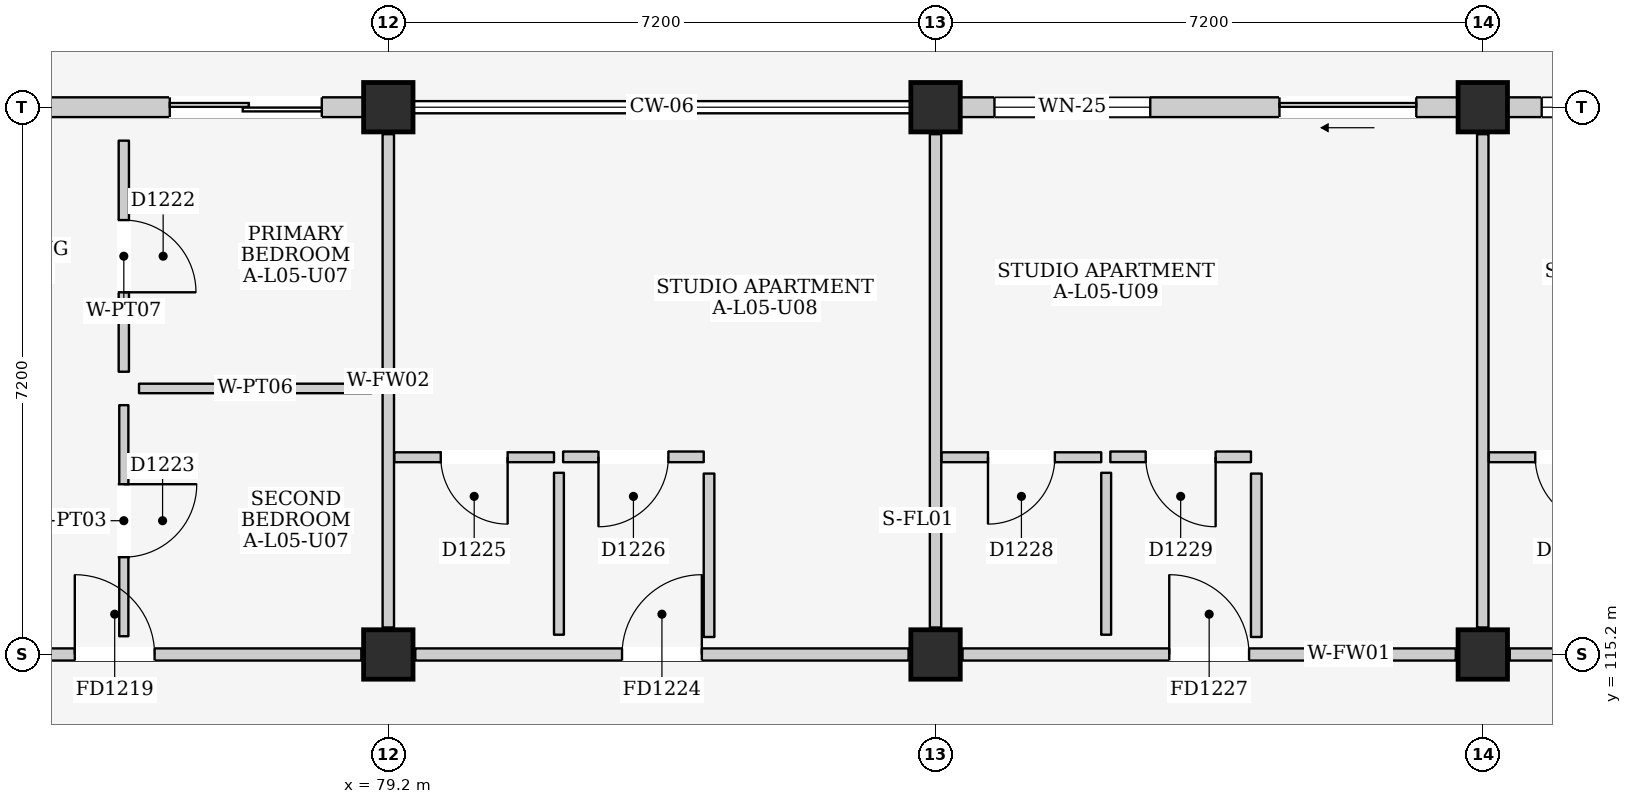
"""IFC4 building model, lengths in metres.
Left out: names, types, materials, properties, quantities, classifications, styles, units other than length and angle.
Written with IfcOpenShell. Run it as: python <this file> out.ifc"""

import sys

from ifc_helpers import new_model, si_unit, direction, frame, frame_2d, origin, origin_2d, place, context, subcontext, project, spatial, rectangle, extrude, element, fill, save


model = new_model("IFC4")
c1 = context("Model", 3, precision=1e-05, world=origin(), true_north=direction((0.0, 1.0)))
c2 = subcontext(c1, "Body", "Model", "MODEL_VIEW")
j1 = project(units=[si_unit("LENGTHUNIT", "METRE"), si_unit("PLANEANGLEUNIT", "RADIAN")], contexts=[c1])
p1 = place(None, origin())
s1 = spatial("IfcSite", under=j1, at=p1, CompositionType="ELEMENT")
p2 = place(p1, origin())
s2 = spatial("IfcBuilding", under=s1, at=p2, CompositionType="ELEMENT")
p3 = place(p2, frame((0.0, 0.0, 18.6)))
s3 = spatial("IfcBuildingStorey", under=s2, at=p3, CompositionType="ELEMENT", Elevation=18.6)
for number, where, z_axis, x_axis in (
    (1, (79.2, 115.2, 0.0), (0.0, 0.0, 1.0), (1.0, 0.0, 0.0)),
    (2, (79.2, 122.4, 0.0), (0.0, 0.0, 1.0), (1.0, 0.0, 0.0)),
    (3, (86.4, 115.2, 0.0), (0.0, 0.0, 1.0), (1.0, 0.0, 0.0)),
    (4, (86.4, 122.4, 0.0), (0.0, 0.0, 1.0), (1.0, 0.0, 0.0)),
    (5, (93.6, 115.2, 0.0), (0.0, 0.0, 1.0), (1.0, 0.0, 0.0)),
    (6, (93.6, 122.4, 0.0), (0.0, 0.0, 1.0), (1.0, 0.0, 0.0)),
):
    element("IfcColumn", number, at=place(p3, frame(where, z_axis=z_axis, x_axis=x_axis)), inside=s3, PredefinedType="COLUMN", context=c2, shape_type="SweptSolid", body=[
        extrude(rectangle(XDim=0.65, YDim=0.65, at=origin_2d()), origin(), (0.0, 0.0, 1.0), 3.3),
    ])
p4 = place(p3, frame((72.325, 122.4, 0.0), z_axis=(0.0, 0.0, 1.0), x_axis=(1.0, 0.0, 0.0)))
e7 = element("IfcWall", 7, at=p4, inside=s3, PredefinedType="ELEMENTEDWALL", context=c2, shape_type="SweptSolid", body=[
    extrude(rectangle(XDim=6.55, YDim=0.26, at=frame_2d((3.275, 0.0))), origin(), (0.0, 0.0, 1.0), 2.595),
])
p5 = place(p4, frame((4.0, 0.0, 0.0)))
e8 = element("IfcOpeningElement", 8, at=p5, cuts=e7, PredefinedType="OPENING", context=c2, shape_type="SweptSolid", body=[
    extrude(rectangle(XDim=2.0, YDim=2.12, at=frame_2d((1.0, 1.06))), frame((0.0, 0.145, 0.0), z_axis=(0.0, -1.0, 0.0), x_axis=(1.0, 0.0, 0.0)), (0.0, 0.0, 1.0), 0.29),
])
p6 = place(p4, frame((0.45, 0.0, 0.9)))
e9 = element("IfcOpeningElement", 9, at=p6, cuts=e7, PredefinedType="OPENING", context=c2, shape_type="SweptSolid", body=[
    extrude(rectangle(XDim=1.85, YDim=1.4, at=frame_2d((0.925, 0.7))), frame((0.0, 0.145, 0.0), z_axis=(0.0, -1.0, 0.0), x_axis=(1.0, 0.0, 0.0)), (0.0, 0.0, 1.0), 0.29),
])
p7 = place(p3, frame((86.725, 122.4, 0.0), z_axis=(0.0, 0.0, 1.0), x_axis=(1.0, 0.0, 0.0)))
e10 = element("IfcWall", 10, at=p7, inside=s3, PredefinedType="ELEMENTEDWALL", context=c2, shape_type="SweptSolid", body=[
    extrude(rectangle(XDim=6.55, YDim=0.26, at=frame_2d((3.275, 0.0))), origin(), (0.0, 0.0, 1.0), 2.595),
])
p8 = place(p7, frame((4.2, 0.0, 0.0)))
e11 = element("IfcOpeningElement", 11, at=p8, cuts=e10, PredefinedType="OPENING", context=c2, shape_type="SweptSolid", body=[
    extrude(rectangle(XDim=1.8, YDim=2.12, at=frame_2d((0.9, 1.06))), frame((0.0, 0.145, 0.0), z_axis=(0.0, -1.0, 0.0), x_axis=(1.0, 0.0, 0.0)), (0.0, 0.0, 1.0), 0.29),
])
p9 = place(p7, frame((0.45, 0.0, 0.885)))
e12 = element("IfcOpeningElement", 12, at=p9, cuts=e10, PredefinedType="OPENING", context=c2, shape_type="SweptSolid", body=[
    extrude(rectangle(XDim=2.05, YDim=1.6, at=frame_2d((1.025, 0.8))), frame((0.0, 0.145, 0.0), z_axis=(0.0, -1.0, 0.0), x_axis=(1.0, 0.0, 0.0)), (0.0, 0.0, 1.0), 0.29),
])
p10 = place(p3, frame((93.925, 122.4, 0.0), z_axis=(0.0, 0.0, 1.0), x_axis=(1.0, 0.0, 0.0)))
e13 = element("IfcWall", 13, at=p10, inside=s3, PredefinedType="ELEMENTEDWALL", context=c2, shape_type="SweptSolid", body=[
    extrude(rectangle(XDim=6.55, YDim=0.26, at=frame_2d((3.275, 0.0))), origin(), (0.0, 0.0, 1.0), 2.595),
])
p11 = place(p10, frame((4.4, 0.0, 0.0)))
e14 = element("IfcOpeningElement", 14, at=p11, cuts=e13, PredefinedType="OPENING", context=c2, shape_type="SweptSolid", body=[
    extrude(rectangle(XDim=1.6, YDim=2.12, at=frame_2d((0.8, 1.06))), frame((0.0, 0.145, 0.0), z_axis=(0.0, -1.0, 0.0), x_axis=(1.0, 0.0, 0.0)), (0.0, 0.0, 1.0), 0.29),
])
p12 = place(p10, frame((0.45, 0.0, 0.9)))
e15 = element("IfcOpeningElement", 15, at=p12, cuts=e13, PredefinedType="OPENING", context=c2, shape_type="SweptSolid", body=[
    extrude(rectangle(XDim=1.75, YDim=1.55, at=frame_2d((0.875, 0.775))), frame((0.0, 0.145, 0.0), z_axis=(0.0, -1.0, 0.0), x_axis=(1.0, 0.0, 0.0)), (0.0, 0.0, 1.0), 0.29),
])
p13 = place(p3, frame((72.355, 115.2, 0.0), z_axis=(0.0, 0.0, 1.0), x_axis=(1.0, 0.0, 0.0)))
e16 = element("IfcWall", 16, at=p13, inside=s3, PredefinedType="PARTITIONING", context=c2, shape_type="SweptSolid", body=[
    extrude(rectangle(XDim=6.49, YDim=0.16, at=frame_2d((3.245, 0.0))), origin(), (0.0, 0.0, 1.0), 2.395),
])
p14 = place(p13, frame((2.72, 0.0, 0.0)))
e17 = element("IfcOpeningElement", 17, at=p14, cuts=e16, PredefinedType="OPENING", context=c2, shape_type="SweptSolid", body=[
    extrude(rectangle(XDim=1.05, YDim=2.15, at=frame_2d((0.525, 1.075))), frame((0.0, 0.095, 0.0), z_axis=(0.0, -1.0, 0.0), x_axis=(1.0, 0.0, 0.0)), (0.0, 0.0, 1.0), 0.19),
])
p15 = place(p3, frame((79.2, 115.555, 0.0), z_axis=(0.0, 0.0, 1.0), x_axis=(0.0, 1.0, 0.0)))
e18 = element("IfcWall", 18, at=p15, inside=s3, PredefinedType="PARTITIONING", context=c2, shape_type="SweptSolid", body=[
    extrude(rectangle(XDim=6.49, YDim=0.15, at=frame_2d((3.245, 0.0))), origin(), (0.0, 0.0, 1.0), 2.545),
])
p16 = place(p3, frame((75.72, 118.92, 0.0), z_axis=(0.0, 0.0, 1.0), x_axis=(0.0, 1.0, 0.0)))
e19 = element("IfcWall", 19, at=p16, inside=s3, PredefinedType="PARTITIONING", context=c2, shape_type="SweptSolid", body=[
    extrude(rectangle(XDim=3.04, YDim=0.135, at=frame_2d((1.52, 0.0))), origin(), (0.0, 0.0, 1.0), 3.06),
])
p17 = place(p16, frame((1.045, 0.0, 0.0)))
e20 = element("IfcOpeningElement", 20, at=p17, cuts=e19, PredefinedType="OPENING", context=c2, shape_type="SweptSolid", body=[
    extrude(rectangle(XDim=0.95, YDim=2.15, at=frame_2d((0.475, 1.075))), frame((0.0, 0.083, 0.0), z_axis=(0.0, -1.0, 0.0), x_axis=(1.0, 0.0, 0.0)), (0.0, 0.0, 1.0), 0.165),
])
p18 = place(p3, frame((75.92, 118.7, 0.0), z_axis=(0.0, 0.0, 1.0), x_axis=(1.0, 0.0, 0.0)))
e21 = element("IfcWall", 21, at=p18, inside=s3, PredefinedType="PARTITIONING", context=c2, shape_type="SweptSolid", body=[
    extrude(rectangle(XDim=3.06, YDim=0.125, at=frame_2d((1.53, 0.0))), origin(), (0.0, 0.0, 1.0), 3.06),
])
p19 = place(p3, frame((75.72, 115.44, 0.0), z_axis=(0.0, 0.0, 1.0), x_axis=(0.0, 1.0, 0.0)))
e22 = element("IfcWall", 22, at=p19, inside=s3, PredefinedType="PARTITIONING", context=c2, shape_type="SweptSolid", body=[
    extrude(rectangle(XDim=3.04, YDim=0.12, at=frame_2d((1.52, 0.0))), origin(), (0.0, 0.0, 1.0), 3.06),
])
p20 = place(p19, frame((1.04, 0.0, 0.0)))
e23 = element("IfcOpeningElement", 23, at=p20, cuts=e22, PredefinedType="OPENING", context=c2, shape_type="SweptSolid", body=[
    extrude(rectangle(XDim=0.96, YDim=2.15, at=frame_2d((0.48, 1.075))), frame((0.0, 0.075, 0.0), z_axis=(0.0, -1.0, 0.0), x_axis=(1.0, 0.0, 0.0)), (0.0, 0.0, 1.0), 0.15),
])
p21 = place(p3, frame((79.555, 115.2, 0.0), z_axis=(0.0, 0.0, 1.0), x_axis=(1.0, 0.0, 0.0)))
e24 = element("IfcWall", 24, at=p21, inside=s3, PredefinedType="PARTITIONING", context=c2, shape_type="SweptSolid", body=[
    extrude(rectangle(XDim=6.49, YDim=0.16, at=frame_2d((3.245, 0.0))), origin(), (0.0, 0.0, 1.0), 2.395),
])
p22 = place(p21, frame((2.72, 0.0, 0.0)))
e25 = element("IfcOpeningElement", 25, at=p22, cuts=e24, PredefinedType="OPENING", context=c2, shape_type="SweptSolid", body=[
    extrude(rectangle(XDim=1.05, YDim=2.15, at=frame_2d((0.525, 1.075))), frame((0.0, 0.095, 0.0), z_axis=(0.0, -1.0, 0.0), x_axis=(1.0, 0.0, 0.0)), (0.0, 0.0, 1.0), 0.19),
])
p23 = place(p3, frame((86.4, 115.555, 0.0), z_axis=(0.0, 0.0, 1.0), x_axis=(0.0, 1.0, 0.0)))
e26 = element("IfcWall", 26, at=p23, inside=s3, PredefinedType="PARTITIONING", context=c2, shape_type="SweptSolid", body=[
    extrude(rectangle(XDim=6.49, YDim=0.15, at=frame_2d((3.245, 0.0))), origin(), (0.0, 0.0, 1.0), 2.545),
])
p24 = place(p3, frame((79.28, 117.795, 0.0), z_axis=(0.0, 0.0, 1.0), x_axis=(1.0, 0.0, 0.0)))
e27 = element("IfcWall", 27, at=p24, inside=s3, PredefinedType="PARTITIONING", context=c2, shape_type="SweptSolid", body=[
    extrude(rectangle(XDim=2.1, YDim=0.13, at=frame_2d((1.05, 0.0))), origin(), (0.0, 0.0, 1.0), 3.06),
])
p25 = place(p24, frame((0.61, 0.0, 0.0)))
e28 = element("IfcOpeningElement", 28, at=p25, cuts=e27, PredefinedType="OPENING", context=c2, shape_type="SweptSolid", body=[
    extrude(rectangle(XDim=0.88, YDim=2.1, at=frame_2d((0.44, 1.05))), frame((0.0, 0.08, 0.0), z_axis=(0.0, -1.0, 0.0), x_axis=(1.0, 0.0, 0.0)), (0.0, 0.0, 1.0), 0.16),
])
p26 = place(p3, frame((81.445, 115.46, 0.0), z_axis=(0.0, 0.0, 1.0), x_axis=(0.0, 1.0, 0.0)))
e29 = element("IfcWall", 29, at=p26, inside=s3, PredefinedType="PARTITIONING", context=c2, shape_type="SweptSolid", body=[
    extrude(rectangle(XDim=2.13, YDim=0.13, at=frame_2d((1.065, 0.0))), origin(), (0.0, 0.0, 1.0), 3.06),
])
p27 = place(p3, frame((81.5, 117.8, 0.0), z_axis=(0.0, 0.0, 1.0), x_axis=(1.0, 0.0, 0.0)))
e30 = element("IfcWall", 30, at=p27, inside=s3, PredefinedType="PARTITIONING", context=c2, shape_type="SweptSolid", body=[
    extrude(rectangle(XDim=1.85, YDim=0.14, at=frame_2d((0.925, 0.0))), origin(), (0.0, 0.0, 1.0), 3.06),
])
p28 = place(p27, frame((0.465, 0.0, 0.0)))
e31 = element("IfcOpeningElement", 31, at=p28, cuts=e30, PredefinedType="OPENING", context=c2, shape_type="SweptSolid", body=[
    extrude(rectangle(XDim=0.92, YDim=2.1, at=frame_2d((0.46, 1.05))), frame((0.0, 0.085, 0.0), z_axis=(0.0, -1.0, 0.0), x_axis=(1.0, 0.0, 0.0)), (0.0, 0.0, 1.0), 0.17),
])
p29 = place(p3, frame((83.42, 115.43, 0.0), z_axis=(0.0, 0.0, 1.0), x_axis=(0.0, 1.0, 0.0)))
e32 = element("IfcWall", 32, at=p29, inside=s3, PredefinedType="PARTITIONING", context=c2, shape_type="SweptSolid", body=[
    extrude(rectangle(XDim=2.15, YDim=0.14, at=frame_2d((1.075, 0.0))), origin(), (0.0, 0.0, 1.0), 3.06),
])
p30 = place(p3, frame((86.755, 115.2, 0.0), z_axis=(0.0, 0.0, 1.0), x_axis=(1.0, 0.0, 0.0)))
e33 = element("IfcWall", 33, at=p30, inside=s3, PredefinedType="PARTITIONING", context=c2, shape_type="SweptSolid", body=[
    extrude(rectangle(XDim=6.49, YDim=0.16, at=frame_2d((3.245, 0.0))), origin(), (0.0, 0.0, 1.0), 2.395),
])
p31 = place(p30, frame((2.72, 0.0, 0.0)))
e34 = element("IfcOpeningElement", 34, at=p31, cuts=e33, PredefinedType="OPENING", context=c2, shape_type="SweptSolid", body=[
    extrude(rectangle(XDim=1.05, YDim=2.15, at=frame_2d((0.525, 1.075))), frame((0.0, 0.095, 0.0), z_axis=(0.0, -1.0, 0.0), x_axis=(1.0, 0.0, 0.0)), (0.0, 0.0, 1.0), 0.19),
])
p32 = place(p3, frame((93.6, 115.555, 0.0), z_axis=(0.0, 0.0, 1.0), x_axis=(0.0, 1.0, 0.0)))
e35 = element("IfcWall", 35, at=p32, inside=s3, PredefinedType="PARTITIONING", context=c2, shape_type="SweptSolid", body=[
    extrude(rectangle(XDim=6.49, YDim=0.15, at=frame_2d((3.245, 0.0))), origin(), (0.0, 0.0, 1.0), 2.545),
])
p33 = place(p3, frame((86.48, 117.795, 0.0), z_axis=(0.0, 0.0, 1.0), x_axis=(1.0, 0.0, 0.0)))
e36 = element("IfcWall", 36, at=p33, inside=s3, PredefinedType="PARTITIONING", context=c2, shape_type="SweptSolid", body=[
    extrude(rectangle(XDim=2.1, YDim=0.13, at=frame_2d((1.05, 0.0))), origin(), (0.0, 0.0, 1.0), 3.06),
])
p34 = place(p33, frame((0.61, 0.0, 0.0)))
e37 = element("IfcOpeningElement", 37, at=p34, cuts=e36, PredefinedType="OPENING", context=c2, shape_type="SweptSolid", body=[
    extrude(rectangle(XDim=0.88, YDim=2.1, at=frame_2d((0.44, 1.05))), frame((0.0, 0.08, 0.0), z_axis=(0.0, -1.0, 0.0), x_axis=(1.0, 0.0, 0.0)), (0.0, 0.0, 1.0), 0.16),
])
p35 = place(p3, frame((88.645, 115.46, 0.0), z_axis=(0.0, 0.0, 1.0), x_axis=(0.0, 1.0, 0.0)))
e38 = element("IfcWall", 38, at=p35, inside=s3, PredefinedType="PARTITIONING", context=c2, shape_type="SweptSolid", body=[
    extrude(rectangle(XDim=2.13, YDim=0.13, at=frame_2d((1.065, 0.0))), origin(), (0.0, 0.0, 1.0), 3.06),
])
p36 = place(p3, frame((88.7, 117.8, 0.0), z_axis=(0.0, 0.0, 1.0), x_axis=(1.0, 0.0, 0.0)))
e39 = element("IfcWall", 39, at=p36, inside=s3, PredefinedType="PARTITIONING", context=c2, shape_type="SweptSolid", body=[
    extrude(rectangle(XDim=1.85, YDim=0.14, at=frame_2d((0.925, 0.0))), origin(), (0.0, 0.0, 1.0), 3.06),
])
p37 = place(p36, frame((0.465, 0.0, 0.0)))
e40 = element("IfcOpeningElement", 40, at=p37, cuts=e39, PredefinedType="OPENING", context=c2, shape_type="SweptSolid", body=[
    extrude(rectangle(XDim=0.92, YDim=2.1, at=frame_2d((0.46, 1.05))), frame((0.0, 0.085, 0.0), z_axis=(0.0, -1.0, 0.0), x_axis=(1.0, 0.0, 0.0)), (0.0, 0.0, 1.0), 0.17),
])
p38 = place(p3, frame((90.62, 115.43, 0.0), z_axis=(0.0, 0.0, 1.0), x_axis=(0.0, 1.0, 0.0)))
e41 = element("IfcWall", 41, at=p38, inside=s3, PredefinedType="PARTITIONING", context=c2, shape_type="SweptSolid", body=[
    extrude(rectangle(XDim=2.15, YDim=0.14, at=frame_2d((1.075, 0.0))), origin(), (0.0, 0.0, 1.0), 3.06),
])
p39 = place(p3, frame((93.955, 115.2, 0.0), z_axis=(0.0, 0.0, 1.0), x_axis=(1.0, 0.0, 0.0)))
e42 = element("IfcWall", 42, at=p39, inside=s3, PredefinedType="PARTITIONING", context=c2, shape_type="SweptSolid", body=[
    extrude(rectangle(XDim=6.49, YDim=0.16, at=frame_2d((3.245, 0.0))), origin(), (0.0, 0.0, 1.0), 2.395),
])
p40 = place(p39, frame((2.72, 0.0, 0.0)))
e43 = element("IfcOpeningElement", 43, at=p40, cuts=e42, PredefinedType="OPENING", context=c2, shape_type="SweptSolid", body=[
    extrude(rectangle(XDim=1.05, YDim=2.15, at=frame_2d((0.525, 1.075))), frame((0.0, 0.095, 0.0), z_axis=(0.0, -1.0, 0.0), x_axis=(1.0, 0.0, 0.0)), (0.0, 0.0, 1.0), 0.19),
])
p41 = place(p3, frame((93.68, 117.795, 0.0), z_axis=(0.0, 0.0, 1.0), x_axis=(1.0, 0.0, 0.0)))
e44 = element("IfcWall", 44, at=p41, inside=s3, PredefinedType="PARTITIONING", context=c2, shape_type="SweptSolid", body=[
    extrude(rectangle(XDim=2.1, YDim=0.13, at=frame_2d((1.05, 0.0))), origin(), (0.0, 0.0, 1.0), 3.06),
])
p42 = place(p41, frame((0.61, 0.0, 0.0)))
e45 = element("IfcOpeningElement", 45, at=p42, cuts=e44, PredefinedType="OPENING", context=c2, shape_type="SweptSolid", body=[
    extrude(rectangle(XDim=0.88, YDim=2.1, at=frame_2d((0.44, 1.05))), frame((0.0, 0.08, 0.0), z_axis=(0.0, -1.0, 0.0), x_axis=(1.0, 0.0, 0.0)), (0.0, 0.0, 1.0), 0.16),
])
p43 = place(p5, frame((2.0, 0.0, 0.0), z_axis=(0.0, 0.0, 1.0), x_axis=(-1.0, 0.0, 0.0)))
e46 = element("IfcDoor", 46, at=p43, inside=s3, OperationType="DOUBLE_DOOR_SLIDING", PredefinedType="DOOR", context=c2, shape_type="SweptSolid", body=[
    extrude(rectangle(XDim=2.0, YDim=2.12, at=frame_2d((1.0, 1.06))), frame((0.0, 0.025, 0.0), z_axis=(0.0, -1.0, 0.0), x_axis=(1.0, 0.0, 0.0)), (0.0, 0.0, 1.0), 0.05),
])
fill(e8, e46)
p44 = place(p8, frame((1.8, 0.0, 0.0), z_axis=(0.0, 0.0, 1.0), x_axis=(-1.0, 0.0, 0.0)))
e47 = element("IfcDoor", 47, at=p44, inside=s3, OperationType="SLIDING_TO_LEFT", PredefinedType="DOOR", context=c2, shape_type="SweptSolid", body=[
    extrude(rectangle(XDim=1.8, YDim=2.12, at=frame_2d((0.9, 1.06))), frame((0.0, 0.025, 0.0), z_axis=(0.0, -1.0, 0.0), x_axis=(1.0, 0.0, 0.0)), (0.0, 0.0, 1.0), 0.05),
])
fill(e11, e47)
p45 = place(p9, origin())
e48 = element("IfcWindow", 48, at=p45, inside=s3, PartitioningType="DOUBLE_PANEL_VERTICAL", PredefinedType="WINDOW", context=c2, shape_type="SweptSolid", body=[
    extrude(rectangle(XDim=2.05, YDim=1.6, at=frame_2d((1.025, 0.8))), frame((0.0, 0.03, 0.0), z_axis=(0.0, -1.0, 0.0), x_axis=(1.0, 0.0, 0.0)), (0.0, 0.0, 1.0), 0.06),
])
fill(e12, e48)
p46 = place(p12, origin())
e49 = element("IfcWindow", 49, at=p46, inside=s3, PartitioningType="DOUBLE_PANEL_VERTICAL", PredefinedType="WINDOW", context=c2, shape_type="SweptSolid", body=[
    extrude(rectangle(XDim=1.75, YDim=1.55, at=frame_2d((0.875, 0.775))), frame((0.0, 0.03, 0.0), z_axis=(0.0, -1.0, 0.0), x_axis=(1.0, 0.0, 0.0)), (0.0, 0.0, 1.0), 0.06),
])
fill(e15, e49)
p47 = place(p14, origin())
e50 = element("IfcDoor", 50, at=p47, inside=s3, OperationType="SINGLE_SWING_LEFT", PredefinedType="DOOR", context=c2, shape_type="SweptSolid", body=[
    extrude(rectangle(XDim=1.05, YDim=2.15, at=frame_2d((0.525, 1.075))), frame((0.0, 0.025, 0.0), z_axis=(0.0, -1.0, 0.0), x_axis=(1.0, 0.0, 0.0)), (0.0, 0.0, 1.0), 0.05),
])
fill(e17, e50)
p48 = place(p17, frame((0.95, 0.0, 0.0), z_axis=(0.0, 0.0, 1.0), x_axis=(-1.0, 0.0, 0.0)))
e51 = element("IfcDoor", 51, at=p48, inside=s3, OperationType="SINGLE_SWING_RIGHT", PredefinedType="DOOR", context=c2, shape_type="SweptSolid", body=[
    extrude(rectangle(XDim=0.95, YDim=2.15, at=frame_2d((0.475, 1.075))), frame((0.0, 0.025, 0.0), z_axis=(0.0, -1.0, 0.0), x_axis=(1.0, 0.0, 0.0)), (0.0, 0.0, 1.0), 0.05),
])
fill(e20, e51)
p49 = place(p20, frame((0.96, 0.0, 0.0), z_axis=(0.0, 0.0, 1.0), x_axis=(-1.0, 0.0, 0.0)))
e52 = element("IfcDoor", 52, at=p49, inside=s3, OperationType="SINGLE_SWING_LEFT", PredefinedType="DOOR", context=c2, shape_type="SweptSolid", body=[
    extrude(rectangle(XDim=0.96, YDim=2.15, at=frame_2d((0.48, 1.075))), frame((0.0, 0.025, 0.0), z_axis=(0.0, -1.0, 0.0), x_axis=(1.0, 0.0, 0.0)), (0.0, 0.0, 1.0), 0.05),
])
fill(e23, e52)
p50 = place(p22, origin())
e53 = element("IfcDoor", 53, at=p50, inside=s3, OperationType="SINGLE_SWING_RIGHT", PredefinedType="DOOR", context=c2, shape_type="SweptSolid", body=[
    extrude(rectangle(XDim=1.05, YDim=2.15, at=frame_2d((0.525, 1.075))), frame((0.0, 0.025, 0.0), z_axis=(0.0, -1.0, 0.0), x_axis=(1.0, 0.0, 0.0)), (0.0, 0.0, 1.0), 0.05),
])
fill(e25, e53)
p51 = place(p25, frame((0.88, 0.0, 0.0), z_axis=(0.0, 0.0, 1.0), x_axis=(-1.0, 0.0, 0.0)))
e54 = element("IfcDoor", 54, at=p51, inside=s3, OperationType="SINGLE_SWING_LEFT", PredefinedType="DOOR", context=c2, shape_type="SweptSolid", body=[
    extrude(rectangle(XDim=0.88, YDim=2.1, at=frame_2d((0.44, 1.05))), frame((0.0, 0.025, 0.0), z_axis=(0.0, -1.0, 0.0), x_axis=(1.0, 0.0, 0.0)), (0.0, 0.0, 1.0), 0.05),
])
fill(e28, e54)
p52 = place(p28, frame((0.92, 0.0, 0.0), z_axis=(0.0, 0.0, 1.0), x_axis=(-1.0, 0.0, 0.0)))
e55 = element("IfcDoor", 55, at=p52, inside=s3, OperationType="SINGLE_SWING_RIGHT", PredefinedType="DOOR", context=c2, shape_type="SweptSolid", body=[
    extrude(rectangle(XDim=0.92, YDim=2.1, at=frame_2d((0.46, 1.05))), frame((0.0, 0.025, 0.0), z_axis=(0.0, -1.0, 0.0), x_axis=(1.0, 0.0, 0.0)), (0.0, 0.0, 1.0), 0.05),
])
fill(e31, e55)
p53 = place(p31, origin())
e56 = element("IfcDoor", 56, at=p53, inside=s3, OperationType="SINGLE_SWING_LEFT", PredefinedType="DOOR", context=c2, shape_type="SweptSolid", body=[
    extrude(rectangle(XDim=1.05, YDim=2.15, at=frame_2d((0.525, 1.075))), frame((0.0, 0.025, 0.0), z_axis=(0.0, -1.0, 0.0), x_axis=(1.0, 0.0, 0.0)), (0.0, 0.0, 1.0), 0.05),
])
fill(e34, e56)
p54 = place(p34, frame((0.88, 0.0, 0.0), z_axis=(0.0, 0.0, 1.0), x_axis=(-1.0, 0.0, 0.0)))
e57 = element("IfcDoor", 57, at=p54, inside=s3, OperationType="SINGLE_SWING_RIGHT", PredefinedType="DOOR", context=c2, shape_type="SweptSolid", body=[
    extrude(rectangle(XDim=0.88, YDim=2.1, at=frame_2d((0.44, 1.05))), frame((0.0, 0.025, 0.0), z_axis=(0.0, -1.0, 0.0), x_axis=(1.0, 0.0, 0.0)), (0.0, 0.0, 1.0), 0.05),
])
fill(e37, e57)
p55 = place(p37, frame((0.92, 0.0, 0.0), z_axis=(0.0, 0.0, 1.0), x_axis=(-1.0, 0.0, 0.0)))
e58 = element("IfcDoor", 58, at=p55, inside=s3, OperationType="SINGLE_SWING_LEFT", PredefinedType="DOOR", context=c2, shape_type="SweptSolid", body=[
    extrude(rectangle(XDim=0.92, YDim=2.1, at=frame_2d((0.46, 1.05))), frame((0.0, 0.025, 0.0), z_axis=(0.0, -1.0, 0.0), x_axis=(1.0, 0.0, 0.0)), (0.0, 0.0, 1.0), 0.05),
])
fill(e40, e58)
p56 = place(p42, frame((0.88, 0.0, 0.0), z_axis=(0.0, 0.0, 1.0), x_axis=(-1.0, 0.0, 0.0)))
e59 = element("IfcDoor", 59, at=p56, inside=s3, OperationType="SINGLE_SWING_LEFT", PredefinedType="DOOR", context=c2, shape_type="SweptSolid", body=[
    extrude(rectangle(XDim=0.88, YDim=2.1, at=frame_2d((0.44, 1.05))), frame((0.0, 0.025, 0.0), z_axis=(0.0, -1.0, 0.0), x_axis=(1.0, 0.0, 0.0)), (0.0, 0.0, 1.0), 0.05),
])
fill(e45, e59)
save(model, sys.argv[1])
